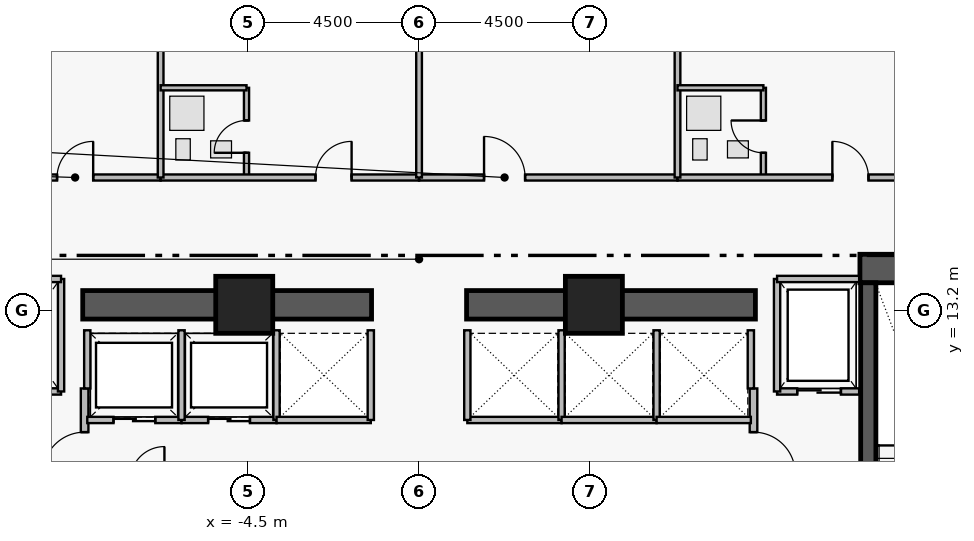
"""IFC4 building model, lengths in metres.
Left out: names, types, materials, properties, quantities, classifications, styles, units other than length and angle.
Written with IfcOpenShell. Run it as: python <this file> out.ifc"""

import sys

from ifc_helpers import new_model, si_unit, direction, frame, frame_2d, origin, origin_2d, place, context, subcontext, project, spatial, rectangle, extrude, element, fill, save


model = new_model("IFC4")
c1 = context("Model", 3, precision=1e-05, world=origin(), true_north=direction((0.0, 1.0)))
c2 = subcontext(c1, "Body", "Model", "MODEL_VIEW")
j1 = project(units=[si_unit("LENGTHUNIT", "METRE"), si_unit("PLANEANGLEUNIT", "RADIAN")], contexts=[c1])
p1 = place(None, origin())
s1 = spatial("IfcSite", under=j1, at=p1, CompositionType="ELEMENT")
p2 = place(p1, origin())
s2 = spatial("IfcBuilding", under=s1, at=p2, CompositionType="ELEMENT")
p3 = place(p2, frame((0.0, 0.0, 132.15)))
s3 = spatial("IfcBuildingStorey", under=s2, at=p3, CompositionType="ELEMENT", Elevation=132.15)
p4 = place(p3, frame((11.6, 14.305, 0.0), z_axis=(0.0, 0.0, 1.0), x_axis=(1.0, 0.0, 0.0)))
e1 = element("IfcWall", 1, at=p4, inside=s3, PredefinedType="SHEAR", context=c2, shape_type="SweptSolid", body=[
    extrude(rectangle(XDim=4.56, YDim=0.75, at=frame_2d((2.28, 0.0))), origin(), (0.0, 0.0, 1.0), 3.46),
])
for number, where, z_axis, x_axis in (
    (2, (-8.85, 13.35, 0.0), (0.0, 0.0, 1.0), (1.0, 0.0, 0.0)),
    (3, (1.25, 13.35, 0.0), (0.0, 0.0, 1.0), (1.0, 0.0, 0.0)),
):
    element("IfcWall", number, at=place(p3, frame(where, z_axis=z_axis, x_axis=x_axis)), inside=s3, PredefinedType="SHEAR", context=c2, shape_type="SweptSolid", body=[
        extrude(rectangle(XDim=7.6, YDim=0.75, at=frame_2d((3.8, 0.0))), origin(), (0.0, 0.0, 1.0), 3.43),
    ])
p5 = place(p3, frame((11.82, 13.93, 0.0), z_axis=(0.0, 0.0, 1.0), x_axis=(0.0, -1.0, 0.0)))
e4 = element("IfcWall", 4, at=p5, inside=s3, PredefinedType="SHEAR", context=c2, shape_type="SweptSolid", body=[
    extrude(rectangle(XDim=8.96, YDim=0.4, at=frame_2d((4.48, 0.0))), origin(), (0.0, 0.0, 1.0), 3.46),
])
p6 = place(p5, frame((7.53, 0.0, 0.0)))
e5 = element("IfcOpeningElement", 5, at=p6, cuts=e4, PredefinedType="OPENING", context=c2, shape_type="SweptSolid", body=[
    extrude(rectangle(XDim=1.12, YDim=2.22, at=frame_2d((0.56, 1.11))), frame((0.0, 0.21, 0.0), z_axis=(0.0, -1.0, 0.0), x_axis=(1.0, 0.0, 0.0)), (0.0, 0.0, 1.0), 0.42),
])
for number, where, z_axis, x_axis in (
    (6, (-4.6, 13.35, 0.0), (0.0, 0.0, 1.0), (1.0, 0.0, 0.0)),
    (7, (4.6, 13.35, 0.0), (0.0, 0.0, 1.0), (1.0, 0.0, 0.0)),
):
    element("IfcColumn", number, at=place(p3, frame(where, z_axis=z_axis, x_axis=x_axis)), inside=s3, PredefinedType="COLUMN", context=c2, shape_type="SweptSolid", body=[
        extrude(rectangle(XDim=1.5, YDim=1.5, at=origin_2d()), origin(), (0.0, 0.0, 1.0), 3.65),
    ])
p7 = place(p3, frame((-8.8, 5.05, 0.0), z_axis=(0.0, 0.0, 1.0), x_axis=(0.0, 1.0, 0.0)))
e8 = element("IfcWall", 8, at=p7, inside=s3, PredefinedType="PARTITIONING", context=c2, shape_type="SweptSolid", body=[
    extrude(rectangle(XDim=6.1, YDim=0.2, at=frame_2d((3.05, 0.0))), origin(), (0.0, 0.0, 1.0), 3.43),
])
p8 = place(p7, frame((0.25, 0.0, 0.0)))
e9 = element("IfcOpeningElement", 9, at=p8, cuts=e8, PredefinedType="OPENING", context=c2, shape_type="SweptSolid", body=[
    extrude(rectangle(XDim=1.1, YDim=2.2, at=frame_2d((0.55, 1.1))), frame((0.0, 0.11, 0.0), z_axis=(0.0, -1.0, 0.0), x_axis=(1.0, 0.0, 0.0)), (0.0, 0.0, 1.0), 0.22),
])
p9 = place(p7, frame((3.85, 0.0, 0.0)))
e10 = element("IfcOpeningElement", 10, at=p9, cuts=e8, PredefinedType="OPENING", context=c2, shape_type="SweptSolid", body=[
    extrude(rectangle(XDim=1.1, YDim=2.2, at=frame_2d((0.55, 1.1))), frame((0.0, 0.11, 0.0), z_axis=(0.0, -1.0, 0.0), x_axis=(1.0, 0.0, 0.0)), (0.0, 0.0, 1.0), 0.22),
])
p10 = place(p3, frame((8.8, 11.15, 0.0), z_axis=(0.0, 0.0, 1.0), x_axis=(0.0, -1.0, 0.0)))
e11 = element("IfcWall", 11, at=p10, inside=s3, PredefinedType="PARTITIONING", context=c2, shape_type="SweptSolid", body=[
    extrude(rectangle(XDim=6.1, YDim=0.2, at=frame_2d((3.05, 0.0))), origin(), (0.0, 0.0, 1.0), 3.43),
])
p11 = place(p10, frame((1.15, 0.0, 0.0)))
e12 = element("IfcOpeningElement", 12, at=p11, cuts=e11, PredefinedType="OPENING", context=c2, shape_type="SweptSolid", body=[
    extrude(rectangle(XDim=1.1, YDim=2.2, at=frame_2d((0.55, 1.1))), frame((0.0, 0.11, 0.0), z_axis=(0.0, -1.0, 0.0), x_axis=(1.0, 0.0, 0.0)), (0.0, 0.0, 1.0), 0.22),
])
p12 = place(p10, frame((4.75, 0.0, 0.0)))
e13 = element("IfcOpeningElement", 13, at=p12, cuts=e11, PredefinedType="OPENING", context=c2, shape_type="SweptSolid", body=[
    extrude(rectangle(XDim=1.1, YDim=2.2, at=frame_2d((0.55, 1.1))), frame((0.0, 0.11, 0.0), z_axis=(0.0, -1.0, 0.0), x_axis=(1.0, 0.0, 0.0)), (0.0, 0.0, 1.0), 0.22),
])
p13 = place(p3, frame((-11.58, 11.07, 0.0), z_axis=(0.0, 0.0, 1.0), x_axis=(1.0, 0.0, 0.0)))
e14 = element("IfcWall", 14, at=p13, inside=s3, PredefinedType="PARTITIONING", context=c2, shape_type="SweptSolid", body=[
    extrude(rectangle(XDim=2.16, YDim=0.165, at=frame_2d((1.08, 0.0))), origin(), (0.0, 0.0, 1.0), 3.43),
])
p14 = place(p13, frame((0.53, 0.0, 0.0)))
e15 = element("IfcOpeningElement", 15, at=p14, cuts=e14, PredefinedType="OPENING", context=c2, shape_type="SweptSolid", body=[
    extrude(rectangle(XDim=1.15, YDim=2.25, at=frame_2d((0.575, 1.125))), frame((0.0, 0.093, 0.0), z_axis=(0.0, -1.0, 0.0), x_axis=(1.0, 0.0, 0.0)), (0.0, 0.0, 1.0), 0.185),
])
p15 = place(p3, frame((9.42, 11.07, 0.0), z_axis=(0.0, 0.0, 1.0), x_axis=(1.0, 0.0, 0.0)))
e16 = element("IfcWall", 16, at=p15, inside=s3, PredefinedType="PARTITIONING", context=c2, shape_type="SweptSolid", body=[
    extrude(rectangle(XDim=2.16, YDim=0.165, at=frame_2d((1.08, 0.0))), origin(), (0.0, 0.0, 1.0), 3.43),
])
p16 = place(p15, frame((0.53, 0.0, 0.0)))
e17 = element("IfcOpeningElement", 17, at=p16, cuts=e16, PredefinedType="OPENING", context=c2, shape_type="SweptSolid", body=[
    extrude(rectangle(XDim=1.15, YDim=2.25, at=frame_2d((0.575, 1.125))), frame((0.0, 0.093, 0.0), z_axis=(0.0, -1.0, 0.0), x_axis=(1.0, 0.0, 0.0)), (0.0, 0.0, 1.0), 0.185),
])
p17 = place(p3, frame((-8.73, 10.32, 0.0), z_axis=(0.0, 0.0, 1.0), x_axis=(1.0, 0.0, 0.0)))
e18 = element("IfcWall", 18, at=p17, inside=s3, PredefinedType="PARTITIONING", context=c2, shape_type="SweptSolid", body=[
    extrude(rectangle(XDim=2.48, YDim=0.165, at=frame_2d((1.24, 0.0))), origin(), (0.0, 0.0, 1.0), 3.43),
])
p18 = place(p17, frame((0.69, 0.0, 0.0)))
e19 = element("IfcOpeningElement", 19, at=p18, cuts=e18, PredefinedType="OPENING", context=c2, shape_type="SweptSolid", body=[
    extrude(rectangle(XDim=1.1, YDim=2.25, at=frame_2d((0.55, 1.125))), frame((0.0, 0.093, 0.0), z_axis=(0.0, -1.0, 0.0), x_axis=(1.0, 0.0, 0.0)), (0.0, 0.0, 1.0), 0.185),
])
p19 = place(p3, frame((-6.25, 10.32, 0.0), z_axis=(0.0, 0.0, 1.0), x_axis=(1.0, 0.0, 0.0)))
e20 = element("IfcWall", 20, at=p19, inside=s3, PredefinedType="PARTITIONING", context=c2, shape_type="SweptSolid", body=[
    extrude(rectangle(XDim=2.5, YDim=0.165, at=frame_2d((1.25, 0.0))), origin(), (0.0, 0.0, 1.0), 3.43),
])
p20 = place(p19, frame((0.7, 0.0, 0.0)))
e21 = element("IfcOpeningElement", 21, at=p20, cuts=e20, PredefinedType="OPENING", context=c2, shape_type="SweptSolid", body=[
    extrude(rectangle(XDim=1.1, YDim=2.25, at=frame_2d((0.55, 1.125))), frame((0.0, 0.093, 0.0), z_axis=(0.0, -1.0, 0.0), x_axis=(1.0, 0.0, 0.0)), (0.0, 0.0, 1.0), 0.185),
])
p21 = place(p3, frame((-13.6, 16.7, 0.0), z_axis=(0.0, 0.0, 1.0), x_axis=(1.0, 0.0, 0.0)))
e22 = element("IfcWall", 22, at=p21, inside=s3, PredefinedType="PARTITIONING", context=c2, shape_type="SweptSolid", body=[
    extrude(rectangle(XDim=6.8, YDim=0.16, at=frame_2d((3.4, 0.0))), origin(), (0.0, 0.0, 1.0), 2.973),
])
p22 = place(p21, frame((4.075, 0.0, 0.0)))
e23 = element("IfcOpeningElement", 23, at=p22, cuts=e22, PredefinedType="OPENING", context=c2, shape_type="SweptSolid", body=[
    extrude(rectangle(XDim=0.95, YDim=2.15, at=frame_2d((0.475, 1.075))), frame((0.0, 0.09, 0.0), z_axis=(0.0, -1.0, 0.0), x_axis=(1.0, 0.0, 0.0)), (0.0, 0.0, 1.0), 0.18),
])
p23 = place(p3, frame((-4.54, 16.7, 0.0), z_axis=(0.0, 0.0, 1.0), x_axis=(0.0, 1.0, 0.0)))
e24 = element("IfcWall", 24, at=p23, inside=s3, PredefinedType="PLUMBINGWALL", context=c2, shape_type="SweptSolid", body=[
    extrude(rectangle(XDim=2.36, YDim=0.135, at=frame_2d((1.18, 0.0))), origin(), (0.0, 0.0, 1.0), 2.503),
])
p24 = place(p23, frame((0.65, 0.0, 0.0)))
e25 = element("IfcOpeningElement", 25, at=p24, cuts=e24, PredefinedType="OPENING", context=c2, shape_type="SweptSolid", body=[
    extrude(rectangle(XDim=0.85, YDim=2.1, at=frame_2d((0.425, 1.05))), frame((0.0, 0.077, 0.0), z_axis=(0.0, -1.0, 0.0), x_axis=(1.0, 0.0, 0.0)), (0.0, 0.0, 1.0), 0.155),
])
p25 = place(p3, frame((-6.8, 16.7, 0.0), z_axis=(0.0, 0.0, 1.0), x_axis=(1.0, 0.0, 0.0)))
e26 = element("IfcWall", 26, at=p25, inside=s3, PredefinedType="PARTITIONING", context=c2, shape_type="SweptSolid", body=[
    extrude(rectangle(XDim=6.8, YDim=0.16, at=frame_2d((3.4, 0.0))), origin(), (0.0, 0.0, 1.0), 2.973),
])
p26 = place(p25, frame((4.075, 0.0, 0.0)))
e27 = element("IfcOpeningElement", 27, at=p26, cuts=e26, PredefinedType="OPENING", context=c2, shape_type="SweptSolid", body=[
    extrude(rectangle(XDim=0.95, YDim=2.15, at=frame_2d((0.475, 1.075))), frame((0.0, 0.09, 0.0), z_axis=(0.0, -1.0, 0.0), x_axis=(1.0, 0.0, 0.0)), (0.0, 0.0, 1.0), 0.18),
])
p27 = place(p3, frame((0.0, 16.7, 0.0), z_axis=(0.0, 0.0, 1.0), x_axis=(1.0, 0.0, 0.0)))
e28 = element("IfcWall", 28, at=p27, inside=s3, PredefinedType="PARTITIONING", context=c2, shape_type="SweptSolid", body=[
    extrude(rectangle(XDim=6.8, YDim=0.16, at=frame_2d((3.4, 0.0))), origin(), (0.0, 0.0, 1.0), 2.973),
])
p28 = place(p27, frame((1.71, 0.0, 0.0)))
e29 = element("IfcOpeningElement", 29, at=p28, cuts=e28, PredefinedType="OPENING", context=c2, shape_type="SweptSolid", body=[
    extrude(rectangle(XDim=1.08, YDim=2.18, at=frame_2d((0.54, 1.09))), frame((0.0, 0.09, 0.0), z_axis=(0.0, -1.0, 0.0), x_axis=(1.0, 0.0, 0.0)), (0.0, 0.0, 1.0), 0.18),
])
p29 = place(p3, frame((9.06, 16.7, 0.0), z_axis=(0.0, 0.0, 1.0), x_axis=(0.0, 1.0, 0.0)))
e30 = element("IfcWall", 30, at=p29, inside=s3, PredefinedType="PLUMBINGWALL", context=c2, shape_type="SweptSolid", body=[
    extrude(rectangle(XDim=2.36, YDim=0.135, at=frame_2d((1.18, 0.0))), origin(), (0.0, 0.0, 1.0), 3.43),
])
p30 = place(p29, frame((0.65, 0.0, 0.0)))
e31 = element("IfcOpeningElement", 31, at=p30, cuts=e30, PredefinedType="OPENING", context=c2, shape_type="SweptSolid", body=[
    extrude(rectangle(XDim=0.85, YDim=2.1, at=frame_2d((0.425, 1.05))), frame((0.0, 0.077, 0.0), z_axis=(0.0, -1.0, 0.0), x_axis=(1.0, 0.0, 0.0)), (0.0, 0.0, 1.0), 0.155),
])
p31 = place(p3, frame((6.8, 16.7, 0.0), z_axis=(0.0, 0.0, 1.0), x_axis=(1.0, 0.0, 0.0)))
e32 = element("IfcWall", 32, at=p31, inside=s3, PredefinedType="PARTITIONING", context=c2, shape_type="SweptSolid", body=[
    extrude(rectangle(XDim=6.8, YDim=0.16, at=frame_2d((3.4, 0.0))), origin(), (0.0, 0.0, 1.0), 2.973),
])
p32 = place(p31, frame((4.075, 0.0, 0.0)))
e33 = element("IfcOpeningElement", 33, at=p32, cuts=e32, PredefinedType="OPENING", context=c2, shape_type="SweptSolid", body=[
    extrude(rectangle(XDim=0.95, YDim=2.15, at=frame_2d((0.475, 1.075))), frame((0.0, 0.09, 0.0), z_axis=(0.0, -1.0, 0.0), x_axis=(1.0, 0.0, 0.0)), (0.0, 0.0, 1.0), 0.18),
])
p33 = place(p3, frame((-9.42, 11.07, 0.0), z_axis=(0.0, 0.0, 1.0), x_axis=(0.0, 1.0, 0.0)))
e34 = element("IfcWall", 34, at=p33, inside=s3, PredefinedType="PARTITIONING", context=c2, shape_type="SweptSolid", body=[
    extrude(rectangle(XDim=2.96, YDim=0.165, at=frame_2d((1.48, 0.0))), origin(), (0.0, 0.0, 1.0), 3.43),
])
p34 = place(p3, frame((-11.58, 14.03, 0.0), z_axis=(0.0, 0.0, 1.0), x_axis=(1.0, 0.0, 0.0)))
e35 = element("IfcWall", 35, at=p34, inside=s3, PredefinedType="PARTITIONING", context=c2, shape_type="SweptSolid", body=[
    extrude(rectangle(XDim=2.16, YDim=0.165, at=frame_2d((1.08, 0.0))), origin(), (0.0, 0.0, 1.0), 3.43),
])
p35 = place(p3, frame((9.42, 11.07, 0.0), z_axis=(0.0, 0.0, 1.0), x_axis=(0.0, 1.0, 0.0)))
e36 = element("IfcWall", 36, at=p35, inside=s3, PredefinedType="PARTITIONING", context=c2, shape_type="SweptSolid", body=[
    extrude(rectangle(XDim=2.96, YDim=0.165, at=frame_2d((1.48, 0.0))), origin(), (0.0, 0.0, 1.0), 3.43),
])
p36 = place(p3, frame((9.42, 14.03, 0.0), z_axis=(0.0, 0.0, 1.0), x_axis=(1.0, 0.0, 0.0)))
e37 = element("IfcWall", 37, at=p36, inside=s3, PredefinedType="PARTITIONING", context=c2, shape_type="SweptSolid", body=[
    extrude(rectangle(XDim=2.16, YDim=0.165, at=frame_2d((1.08, 0.0))), origin(), (0.0, 0.0, 1.0), 3.43),
])
p37 = place(p3, frame((-8.73, 11.15, 0.0), z_axis=(0.0, 0.0, 1.0), x_axis=(0.0, 1.0, 0.0)))
e38 = element("IfcWall", 38, at=p37, inside=s3, PredefinedType="PARTITIONING", context=c2, shape_type="SweptSolid", body=[
    extrude(rectangle(XDim=1.53, YDim=0.165, at=frame_2d((0.765, 0.0))), origin(), (0.0, 0.0, 1.0), 3.43),
])
for number, where, z_axis, x_axis in (
    (39, (-6.25, 10.32, 0.0), (0.0, 0.0, 1.0), (0.0, 1.0, 0.0)),
    (40, (-3.75, 10.32, 0.0), (0.0, 0.0, 1.0), (0.0, 1.0, 0.0)),
):
    element("IfcWall", number, at=place(p3, frame(where, z_axis=z_axis, x_axis=x_axis)), inside=s3, PredefinedType="PARTITIONING", context=c2, shape_type="SweptSolid", body=[
        extrude(rectangle(XDim=2.36, YDim=0.165, at=frame_2d((1.18, 0.0))), origin(), (0.0, 0.0, 1.0), 3.43),
    ])
p38 = place(p3, frame((-3.75, 10.32, 0.0), z_axis=(0.0, 0.0, 1.0), x_axis=(1.0, 0.0, 0.0)))
e41 = element("IfcWall", 41, at=p38, inside=s3, PredefinedType="PARTITIONING", context=c2, shape_type="SweptSolid", body=[
    extrude(rectangle(XDim=2.48, YDim=0.165, at=frame_2d((1.24, 0.0))), origin(), (0.0, 0.0, 1.0), 3.43),
])
p39 = place(p3, frame((-1.27, 10.32, 0.0), z_axis=(0.0, 0.0, 1.0), x_axis=(0.0, 1.0, 0.0)))
e42 = element("IfcWall", 42, at=p39, inside=s3, PredefinedType="PARTITIONING", context=c2, shape_type="SweptSolid", body=[
    extrude(rectangle(XDim=2.36, YDim=0.165, at=frame_2d((1.18, 0.0))), origin(), (0.0, 0.0, 1.0), 3.43),
])
p40 = place(p3, frame((1.27, 10.32, 0.0), z_axis=(0.0, 0.0, 1.0), x_axis=(1.0, 0.0, 0.0)))
e43 = element("IfcWall", 43, at=p40, inside=s3, PredefinedType="PARTITIONING", context=c2, shape_type="SweptSolid", body=[
    extrude(rectangle(XDim=2.48, YDim=0.165, at=frame_2d((1.24, 0.0))), origin(), (0.0, 0.0, 1.0), 3.43),
])
for number, where, z_axis, x_axis in (
    (44, (1.27, 10.32, 0.0), (0.0, 0.0, 1.0), (0.0, 1.0, 0.0)),
    (45, (3.75, 10.32, 0.0), (0.0, 0.0, 1.0), (0.0, 1.0, 0.0)),
):
    element("IfcWall", number, at=place(p3, frame(where, z_axis=z_axis, x_axis=x_axis)), inside=s3, PredefinedType="PARTITIONING", context=c2, shape_type="SweptSolid", body=[
        extrude(rectangle(XDim=2.36, YDim=0.165, at=frame_2d((1.18, 0.0))), origin(), (0.0, 0.0, 1.0), 3.43),
    ])
p41 = place(p3, frame((3.75, 10.32, 0.0), z_axis=(0.0, 0.0, 1.0), x_axis=(1.0, 0.0, 0.0)))
e46 = element("IfcWall", 46, at=p41, inside=s3, PredefinedType="PARTITIONING", context=c2, shape_type="SweptSolid", body=[
    extrude(rectangle(XDim=2.5, YDim=0.165, at=frame_2d((1.25, 0.0))), origin(), (0.0, 0.0, 1.0), 3.43),
])
p42 = place(p3, frame((6.25, 10.32, 0.0), z_axis=(0.0, 0.0, 1.0), x_axis=(0.0, 1.0, 0.0)))
e47 = element("IfcWall", 47, at=p42, inside=s3, PredefinedType="PARTITIONING", context=c2, shape_type="SweptSolid", body=[
    extrude(rectangle(XDim=2.36, YDim=0.165, at=frame_2d((1.18, 0.0))), origin(), (0.0, 0.0, 1.0), 3.43),
])
p43 = place(p3, frame((6.25, 10.32, 0.0), z_axis=(0.0, 0.0, 1.0), x_axis=(1.0, 0.0, 0.0)))
e48 = element("IfcWall", 48, at=p43, inside=s3, PredefinedType="PARTITIONING", context=c2, shape_type="SweptSolid", body=[
    extrude(rectangle(XDim=2.48, YDim=0.165, at=frame_2d((1.24, 0.0))), origin(), (0.0, 0.0, 1.0), 3.43),
])
p44 = place(p3, frame((8.73, 11.15, 0.0), z_axis=(0.0, 0.0, 1.0), x_axis=(0.0, 1.0, 0.0)))
e49 = element("IfcWall", 49, at=p44, inside=s3, PredefinedType="PARTITIONING", context=c2, shape_type="SweptSolid", body=[
    extrude(rectangle(XDim=1.53, YDim=0.165, at=frame_2d((0.765, 0.0))), origin(), (0.0, 0.0, 1.0), 3.43),
])
p45 = place(p3, frame((-6.8, 16.7, 0.0), z_axis=(0.0, 0.0, 1.0), x_axis=(0.0, 1.0, 0.0)))
e50 = element("IfcWall", 50, at=p45, inside=s3, PredefinedType="PARTITIONING", context=c2, shape_type="SweptSolid", body=[
    extrude(rectangle(XDim=11.62, YDim=0.15, at=frame_2d((5.81, 0.0))), origin(), (0.0, 0.0, 1.0), 3.43),
])
p46 = place(p3, frame((-6.8, 19.06, 0.0), z_axis=(0.0, 0.0, 1.0), x_axis=(1.0, 0.0, 0.0)))
e51 = element("IfcWall", 51, at=p46, inside=s3, PredefinedType="PLUMBINGWALL", context=c2, shape_type="SweptSolid", body=[
    extrude(rectangle(XDim=2.26, YDim=0.135, at=frame_2d((1.13, 0.0))), origin(), (0.0, 0.0, 1.0), 2.973),
])
p47 = place(p3, frame((0.0, 16.7, 0.0), z_axis=(0.0, 0.0, 1.0), x_axis=(0.0, 1.0, 0.0)))
e52 = element("IfcWall", 52, at=p47, inside=s3, PredefinedType="PARTITIONING", context=c2, shape_type="SweptSolid", body=[
    extrude(rectangle(XDim=11.62, YDim=0.15, at=frame_2d((5.81, 0.0))), origin(), (0.0, 0.0, 1.0), 3.43),
])
p48 = place(p3, frame((6.8, 16.7, 0.0), z_axis=(0.0, 0.0, 1.0), x_axis=(0.0, 1.0, 0.0)))
e53 = element("IfcWall", 53, at=p48, inside=s3, PredefinedType="PARTITIONING", context=c2, shape_type="SweptSolid", body=[
    extrude(rectangle(XDim=11.64, YDim=0.15, at=frame_2d((5.82, 0.0))), origin(), (0.0, 0.0, 1.0), 3.43),
])
p49 = place(p3, frame((6.8, 19.06, 0.0), z_axis=(0.0, 0.0, 1.0), x_axis=(1.0, 0.0, 0.0)))
e54 = element("IfcWall", 54, at=p49, inside=s3, PredefinedType="PLUMBINGWALL", context=c2, shape_type="SweptSolid", body=[
    extrude(rectangle(XDim=2.26, YDim=0.135, at=frame_2d((1.13, 0.0))), origin(), (0.0, 0.0, 1.0), 2.973),
])
p50 = place(p9, origin())
e55 = element("IfcDoor", 55, at=p50, inside=s3, OperationType="SINGLE_SWING_LEFT", PredefinedType="DOOR", context=c2, shape_type="SweptSolid", body=[
    extrude(rectangle(XDim=1.1, YDim=2.2, at=frame_2d((0.55, 1.1))), frame((0.0, 0.025, 0.0), z_axis=(0.0, -1.0, 0.0), x_axis=(1.0, 0.0, 0.0)), (0.0, 0.0, 1.0), 0.05),
])
fill(e10, e55)
p51 = place(p11, origin())
e56 = element("IfcDoor", 56, at=p51, inside=s3, OperationType="SINGLE_SWING_RIGHT", PredefinedType="DOOR", context=c2, shape_type="SweptSolid", body=[
    extrude(rectangle(XDim=1.1, YDim=2.2, at=frame_2d((0.55, 1.1))), frame((0.0, 0.025, 0.0), z_axis=(0.0, -1.0, 0.0), x_axis=(1.0, 0.0, 0.0)), (0.0, 0.0, 1.0), 0.05),
])
fill(e12, e56)
p52 = place(p16, origin())
e57 = element("IfcDoor", 57, at=p52, inside=s3, OperationType="SLIDING_TO_LEFT", PredefinedType="DOOR", context=c2, shape_type="SweptSolid", body=[
    extrude(rectangle(XDim=1.15, YDim=2.25, at=frame_2d((0.575, 1.125))), frame((0.0, 0.025, 0.0), z_axis=(0.0, -1.0, 0.0), x_axis=(1.0, 0.0, 0.0)), (0.0, 0.0, 1.0), 0.05),
])
fill(e17, e57)
p53 = place(p18, origin())
e58 = element("IfcDoor", 58, at=p53, inside=s3, OperationType="SLIDING_TO_LEFT", PredefinedType="DOOR", context=c2, shape_type="SweptSolid", body=[
    extrude(rectangle(XDim=1.1, YDim=2.25, at=frame_2d((0.55, 1.125))), frame((0.0, 0.025, 0.0), z_axis=(0.0, -1.0, 0.0), x_axis=(1.0, 0.0, 0.0)), (0.0, 0.0, 1.0), 0.05),
])
fill(e19, e58)
p54 = place(p20, origin())
e59 = element("IfcDoor", 59, at=p54, inside=s3, OperationType="SLIDING_TO_LEFT", PredefinedType="DOOR", context=c2, shape_type="SweptSolid", body=[
    extrude(rectangle(XDim=1.1, YDim=2.25, at=frame_2d((0.55, 1.125))), frame((0.0, 0.025, 0.0), z_axis=(0.0, -1.0, 0.0), x_axis=(1.0, 0.0, 0.0)), (0.0, 0.0, 1.0), 0.05),
])
fill(e21, e59)
p55 = place(p22, origin())
e60 = element("IfcDoor", 60, at=p55, inside=s3, OperationType="SINGLE_SWING_RIGHT", PredefinedType="DOOR", context=c2, shape_type="SweptSolid", body=[
    extrude(rectangle(XDim=0.95, YDim=2.15, at=frame_2d((0.475, 1.075))), frame((0.0, 0.025, 0.0), z_axis=(0.0, -1.0, 0.0), x_axis=(1.0, 0.0, 0.0)), (0.0, 0.0, 1.0), 0.05),
])
fill(e23, e60)
p56 = place(p24, origin())
e61 = element("IfcDoor", 61, at=p56, inside=s3, OperationType="SINGLE_SWING_LEFT", PredefinedType="DOOR", context=c2, shape_type="SweptSolid", body=[
    extrude(rectangle(XDim=0.85, YDim=2.1, at=frame_2d((0.425, 1.05))), frame((0.0, 0.025, 0.0), z_axis=(0.0, -1.0, 0.0), x_axis=(1.0, 0.0, 0.0)), (0.0, 0.0, 1.0), 0.05),
])
fill(e25, e61)
p57 = place(p26, origin())
e62 = element("IfcDoor", 62, at=p57, inside=s3, OperationType="SINGLE_SWING_RIGHT", PredefinedType="DOOR", context=c2, shape_type="SweptSolid", body=[
    extrude(rectangle(XDim=0.95, YDim=2.15, at=frame_2d((0.475, 1.075))), frame((0.0, 0.025, 0.0), z_axis=(0.0, -1.0, 0.0), x_axis=(1.0, 0.0, 0.0)), (0.0, 0.0, 1.0), 0.05),
])
fill(e27, e62)
p58 = place(p28, origin())
e63 = element("IfcDoor", 63, at=p58, inside=s3, OperationType="SINGLE_SWING_LEFT", PredefinedType="DOOR", context=c2, shape_type="SweptSolid", body=[
    extrude(rectangle(XDim=1.08, YDim=2.18, at=frame_2d((0.54, 1.09))), frame((0.0, 0.025, 0.0), z_axis=(0.0, -1.0, 0.0), x_axis=(1.0, 0.0, 0.0)), (0.0, 0.0, 1.0), 0.05),
])
fill(e29, e63)
p59 = place(p30, origin())
e64 = element("IfcDoor", 64, at=p59, inside=s3, OperationType="SINGLE_SWING_RIGHT", PredefinedType="DOOR", context=c2, shape_type="SweptSolid", body=[
    extrude(rectangle(XDim=0.85, YDim=2.1, at=frame_2d((0.425, 1.05))), frame((0.0, 0.025, 0.0), z_axis=(0.0, -1.0, 0.0), x_axis=(1.0, 0.0, 0.0)), (0.0, 0.0, 1.0), 0.05),
])
fill(e31, e64)
p60 = place(p32, origin())
e65 = element("IfcDoor", 65, at=p60, inside=s3, OperationType="SINGLE_SWING_LEFT", PredefinedType="DOOR", context=c2, shape_type="SweptSolid", body=[
    extrude(rectangle(XDim=0.95, YDim=2.15, at=frame_2d((0.475, 1.075))), frame((0.0, 0.025, 0.0), z_axis=(0.0, -1.0, 0.0), x_axis=(1.0, 0.0, 0.0)), (0.0, 0.0, 1.0), 0.05),
])
fill(e33, e65)
save(model, sys.argv[1])
